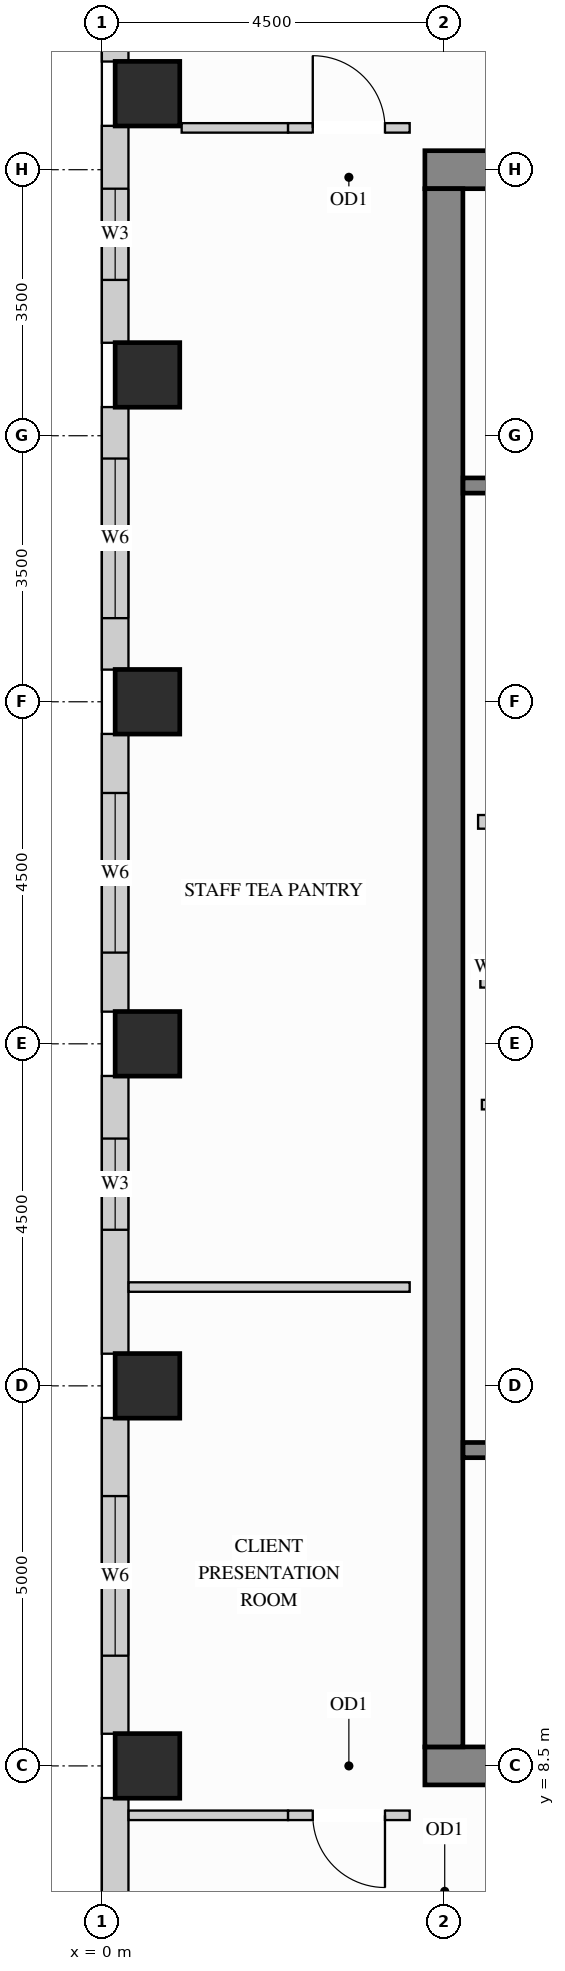
"""IFC4 building model, lengths in metres.
Left out: names, types, materials, properties, quantities, classifications, styles, units other than length and angle.
Written with IfcOpenShell. Run it as: python <this file> out.ifc"""

import sys

from ifc_helpers import new_model, si_unit, direction, frame, frame_2d, origin, origin_2d, place, context, subcontext, project, spatial, rectangle, extrude, source, transform, mapped, element, fill, save


model = new_model("IFC4")
c1 = context("Model", 3, precision=1e-05, world=origin(), true_north=direction((0.0, 1.0)))
c2 = subcontext(c1, "Body", "Model", "MODEL_VIEW")
j1 = project(units=[si_unit("LENGTHUNIT", "METRE"), si_unit("PLANEANGLEUNIT", "RADIAN")], contexts=[c1])
p1 = place(None, origin())
s1 = spatial("IfcSite", under=j1, at=p1, CompositionType="ELEMENT")
p2 = place(p1, origin())
s2 = spatial("IfcBuilding", under=s1, at=p2, CompositionType="ELEMENT")
p3 = place(p2, frame((0.0, 0.0, 241.2)))
s3 = spatial("IfcBuildingStorey", under=s2, at=p3, CompositionType="ELEMENT", Elevation=241.2)
m1 = source(origin(), c2, "Body", "SweptSolid", [
    extrude(rectangle(XDim=0.85, YDim=0.85, at=origin_2d()), origin(), (0.0, 0.0, 1.0), 3.4),
])
for number, where, z_axis, x_axis in (
    (1, (0.6, 13.5, 0.0), (0.0, 0.0, 1.0), (1.0, 0.0, 0.0)),
    (2, (0.6, 18.0, 0.0), (0.0, 0.0, 1.0), (1.0, 0.0, 0.0)),
    (3, (0.6, 22.5, 0.0), (0.0, 0.0, 1.0), (1.0, 0.0, 0.0)),
    (4, (0.6, 26.8, 0.0), (0.0, 0.0, 1.0), (1.0, 0.0, 0.0)),
    (5, (0.6, 30.5, 0.0), (0.0, 0.0, 1.0), (1.0, 0.0, 0.0)),
    (6, (0.6, 8.5, 0.0), (0.0, 0.0, 1.0), (1.0, 0.0, 0.0)),
):
    element("IfcColumn", number, at=place(p3, frame(where, z_axis=z_axis, x_axis=x_axis)), inside=s3, PredefinedType="COLUMN", context=c2, shape_type="MappedRepresentation", body=[
        mapped(m1, transform((0.0, 0.0, 0.0), x_axis=(1.0, 0.0, 0.0), y_axis=(0.0, 1.0, 0.0), z_axis=(0.0, 0.0, 1.0))),
    ])
m2 = source(origin(), c2, "Body", "SweptSolid", [
    extrude(rectangle(XDim=10.5, YDim=0.5, at=frame_2d((5.25, 0.0))), origin(), (0.0, 0.0, 1.0), 3.4),
])
for number, where, z_axis, x_axis in (
    (7, (4.25, 29.5, 0.0), (0.0, 0.0, 1.0), (1.0, 0.0, 0.0)),
    (8, (4.25, 8.5, 0.0), (0.0, 0.0, 1.0), (1.0, 0.0, 0.0)),
):
    element("IfcWall", number, at=place(p3, frame(where, z_axis=z_axis, x_axis=x_axis)), inside=s3, PredefinedType="SHEAR", context=c2, shape_type="MappedRepresentation", body=[
        mapped(m2, transform((0.0, 0.0, 0.0), x_axis=(1.0, 0.0, 0.0), y_axis=(0.0, 1.0, 0.0), z_axis=(0.0, 0.0, 1.0))),
    ])
m3 = source(origin(), c2, "Body", "SweptSolid", [
    extrude(rectangle(XDim=20.5, YDim=0.5, at=frame_2d((10.25, 0.0))), origin(), (0.0, 0.0, 1.0), 3.4),
])
p4 = place(p3, frame((4.5, 8.75, 0.0), z_axis=(0.0, 0.0, 1.0), x_axis=(0.0, 1.0, 0.0)))
e9 = element("IfcWall", 9, at=p4, inside=s3, PredefinedType="SHEAR", context=c2, shape_type="MappedRepresentation", body=[
    mapped(m3, transform((0.0, 0.0, 0.0), x_axis=(1.0, 0.0, 0.0), y_axis=(0.0, 1.0, 0.0), z_axis=(0.0, 0.0, 1.0))),
])
m4 = source(origin(), c2, "Body", "SweptSolid", [
    extrude(rectangle(XDim=0.527, YDim=0.35, at=frame_2d((0.263, 0.0))), origin(), (0.0, 0.0, 1.0), 3.385),
])
p5 = place(p3, frame((0.175, 31.45, 0.0), z_axis=(0.0, 0.0, 1.0), x_axis=(0.0, -1.0, 0.0)))
e10 = element("IfcWall", 10, at=p5, inside=s3, PredefinedType="SOLIDWALL", context=c2, shape_type="MappedRepresentation", body=[
    mapped(m4, transform((0.0, 0.0, 0.0), x_axis=(1.0, 0.0, 0.0), y_axis=(0.0, 1.0, 0.0), z_axis=(0.0, 0.0, 1.0))),
])
p6 = place(p3, frame((0.175, 30.077, 0.0), z_axis=(0.0, 0.0, 1.0), x_axis=(0.0, -1.0, 0.0)))
e11 = element("IfcWall", 11, at=p6, inside=s3, PredefinedType="SOLIDWALL", context=c2, shape_type="SweptSolid", body=[
    extrude(rectangle(XDim=2.854, YDim=0.35, at=frame_2d((1.427, 0.0))), origin(), (0.0, 0.0, 1.0), 3.385),
])
p7 = place(p6, frame((0.827, 0.0, 0.78)))
e12 = element("IfcOpeningElement", 12, at=p7, cuts=e11, PredefinedType="OPENING", context=c2, shape_type="SweptSolid", body=[
    extrude(rectangle(XDim=1.2, YDim=2.25, at=frame_2d((0.6, 1.125))), frame((0.0, 0.185, 0.0), z_axis=(0.0, -1.0, 0.0), x_axis=(1.0, 0.0, 0.0)), (0.0, 0.0, 1.0), 0.37),
])
p8 = place(p3, frame((0.175, 26.377, 0.0), z_axis=(0.0, 0.0, 1.0), x_axis=(0.0, -1.0, 0.0)))
e13 = element("IfcWall", 13, at=p8, inside=s3, PredefinedType="SOLIDWALL", context=c2, shape_type="SweptSolid", body=[
    extrude(rectangle(XDim=3.454, YDim=0.35, at=frame_2d((1.727, 0.0))), origin(), (0.0, 0.0, 1.0), 3.385),
])
p9 = place(p8, frame((0.677, 0.0, 0.78)))
e14 = element("IfcOpeningElement", 14, at=p9, cuts=e13, PredefinedType="OPENING", context=c2, shape_type="SweptSolid", body=[
    extrude(rectangle(XDim=2.1, YDim=2.25, at=frame_2d((1.05, 1.125))), frame((0.0, 0.185, 0.0), z_axis=(0.0, -1.0, 0.0), x_axis=(1.0, 0.0, 0.0)), (0.0, 0.0, 1.0), 0.37),
])
p10 = place(p3, frame((0.175, 22.077, 0.0), z_axis=(0.0, 0.0, 1.0), x_axis=(0.0, -1.0, 0.0)))
e15 = element("IfcWall", 15, at=p10, inside=s3, PredefinedType="SOLIDWALL", context=c2, shape_type="SweptSolid", body=[
    extrude(rectangle(XDim=3.654, YDim=0.35, at=frame_2d((1.827, 0.0))), origin(), (0.0, 0.0, 1.0), 3.385),
])
p11 = place(p10, frame((0.777, 0.0, 0.78)))
e16 = element("IfcOpeningElement", 16, at=p11, cuts=e15, PredefinedType="OPENING", context=c2, shape_type="SweptSolid", body=[
    extrude(rectangle(XDim=2.1, YDim=2.25, at=frame_2d((1.05, 1.125))), frame((0.0, 0.185, 0.0), z_axis=(0.0, -1.0, 0.0), x_axis=(1.0, 0.0, 0.0)), (0.0, 0.0, 1.0), 0.37),
])
p12 = place(p3, frame((0.175, 17.577, 0.0), z_axis=(0.0, 0.0, 1.0), x_axis=(0.0, -1.0, 0.0)))
e17 = element("IfcWall", 17, at=p12, inside=s3, PredefinedType="SOLIDWALL", context=c2, shape_type="SweptSolid", body=[
    extrude(rectangle(XDim=3.654, YDim=0.35, at=frame_2d((1.827, 0.0))), origin(), (0.0, 0.0, 1.0), 3.385),
])
p13 = place(p12, frame((0.823, 0.0, 0.78)))
e18 = element("IfcOpeningElement", 18, at=p13, cuts=e17, PredefinedType="OPENING", context=c2, shape_type="SweptSolid", body=[
    extrude(rectangle(XDim=1.2, YDim=2.25, at=frame_2d((0.6, 1.125))), frame((0.0, 0.185, 0.0), z_axis=(0.0, -1.0, 0.0), x_axis=(1.0, 0.0, 0.0)), (0.0, 0.0, 1.0), 0.37),
])
p14 = place(p3, frame((0.175, 13.077, 0.0), z_axis=(0.0, 0.0, 1.0), x_axis=(0.0, -1.0, 0.0)))
e19 = element("IfcWall", 19, at=p14, inside=s3, PredefinedType="SOLIDWALL", context=c2, shape_type="SweptSolid", body=[
    extrude(rectangle(XDim=4.154, YDim=0.35, at=frame_2d((2.077, 0.0))), origin(), (0.0, 0.0, 1.0), 3.385),
])
p15 = place(p14, frame((1.027, 0.0, 0.78)))
e20 = element("IfcOpeningElement", 20, at=p15, cuts=e19, PredefinedType="OPENING", context=c2, shape_type="SweptSolid", body=[
    extrude(rectangle(XDim=2.1, YDim=2.25, at=frame_2d((1.05, 1.125))), frame((0.0, 0.185, 0.0), z_axis=(0.0, -1.0, 0.0), x_axis=(1.0, 0.0, 0.0)), (0.0, 0.0, 1.0), 0.37),
])
p16 = place(p3, frame((0.175, 8.077, 0.0), z_axis=(0.0, 0.0, 1.0), x_axis=(0.0, -1.0, 0.0)))
e21 = element("IfcWall", 21, at=p16, inside=s3, PredefinedType="SOLIDWALL", context=c2, shape_type="SweptSolid", body=[
    extrude(rectangle(XDim=4.154, YDim=0.35, at=frame_2d((2.077, 0.0))), origin(), (0.0, 0.0, 1.0), 3.385),
])
p17 = place(p16, frame((2.381, 0.0, 0.78)))
e22 = element("IfcOpeningElement", 22, at=p17, cuts=e21, PredefinedType="OPENING", context=c2, shape_type="SweptSolid", body=[
    extrude(rectangle(XDim=1.2, YDim=2.25, at=frame_2d((0.6, 1.125))), frame((0.0, 0.185, 0.0), z_axis=(0.0, -1.0, 0.0), x_axis=(1.0, 0.0, 0.0)), (0.0, 0.0, 1.0), 0.37),
])
m5 = source(origin(), c2, "Body", "SweptSolid", [
    extrude(rectangle(XDim=2.2, YDim=0.18, at=frame_2d((1.1, 0.0))), origin(), (0.0, 0.0, 1.0), 3.385),
])
p18 = place(p3, frame((4.95, 20.92, 0.0), z_axis=(0.0, 0.0, 1.0), x_axis=(1.0, 0.0, 0.0)))
e23 = element("IfcWall", 23, at=p18, inside=s3, PredefinedType="PARTITIONING", context=c2, shape_type="MappedRepresentation", body=[
    mapped(m5, transform((0.0, 0.0, 0.0), x_axis=(1.0, 0.0, 0.0), y_axis=(0.0, 1.0, 0.0), z_axis=(0.0, 0.0, 1.0))),
])
p19 = place(p3, frame((5.0, 17.2, 0.0), z_axis=(0.0, 0.0, 1.0), x_axis=(1.0, 0.0, 0.0)))
e24 = element("IfcWall", 24, at=p19, inside=s3, PredefinedType="PARTITIONING", context=c2, shape_type="SweptSolid", body=[
    extrude(rectangle(XDim=2.4, YDim=0.125, at=frame_2d((1.2, 0.0))), origin(), (0.0, 0.0, 1.0), 3.385),
])
p20 = place(p19, frame((0.7, 0.0, 0.0)))
e25 = element("IfcOpeningElement", 25, at=p20, cuts=e24, PredefinedType="OPENING", context=c2, shape_type="SweptSolid", body=[
    extrude(rectangle(XDim=0.85, YDim=2.1, at=frame_2d((0.425, 1.05))), frame((0.0, 0.073, 0.0), z_axis=(0.0, -1.0, 0.0), x_axis=(1.0, 0.0, 0.0)), (0.0, 0.0, 1.0), 0.145),
])
m6 = source(origin(), c2, "Body", "SweptSolid", [
    extrude(rectangle(XDim=1.4, YDim=0.125, at=frame_2d((0.7, 0.0))), origin(), (0.0, 0.0, 1.0), 3.385),
])
p21 = place(p3, frame((1.05, 30.05, 0.0), z_axis=(0.0, 0.0, 1.0), x_axis=(1.0, 0.0, 0.0)))
e26 = element("IfcWall", 26, at=p21, inside=s3, PredefinedType="PARTITIONING", context=c2, shape_type="MappedRepresentation", body=[
    mapped(m6, transform((0.0, 0.0, 0.0), x_axis=(1.0, 0.0, 0.0), y_axis=(0.0, 1.0, 0.0), z_axis=(0.0, 0.0, 1.0))),
])
p22 = place(p3, frame((2.45, 30.05, 0.0), z_axis=(0.0, 0.0, 1.0), x_axis=(1.0, 0.0, 0.0)))
e27 = element("IfcWall", 27, at=p22, inside=s3, PredefinedType="PARTITIONING", context=c2, shape_type="SweptSolid", body=[
    extrude(rectangle(XDim=1.6, YDim=0.125, at=frame_2d((0.8, 0.0))), origin(), (0.0, 0.0, 1.0), 3.385),
])
p23 = place(p22, frame((0.325, 0.0, 0.0)))
e28 = element("IfcOpeningElement", 28, at=p23, cuts=e27, PredefinedType="OPENING", context=c2, shape_type="SweptSolid", body=[
    extrude(rectangle(XDim=0.95, YDim=2.15, at=frame_2d((0.475, 1.075))), frame((0.0, 0.073, 0.0), z_axis=(0.0, -1.0, 0.0), x_axis=(1.0, 0.0, 0.0)), (0.0, 0.0, 1.0), 0.145),
])
m7 = source(origin(), c2, "Body", "SweptSolid", [
    extrude(rectangle(XDim=2.098, YDim=0.125, at=frame_2d((1.049, 0.0))), origin(), (0.0, 0.0, 1.0), 3.385),
])
p24 = place(p3, frame((0.352, 7.85, 0.0), z_axis=(0.0, 0.0, 1.0), x_axis=(1.0, 0.0, 0.0)))
e29 = element("IfcWall", 29, at=p24, inside=s3, PredefinedType="PARTITIONING", context=c2, shape_type="MappedRepresentation", body=[
    mapped(m7, transform((0.0, 0.0, 0.0), x_axis=(1.0, 0.0, 0.0), y_axis=(0.0, 1.0, 0.0), z_axis=(0.0, 0.0, 1.0))),
])
p25 = place(p3, frame((2.45, 7.85, 0.0), z_axis=(0.0, 0.0, 1.0), x_axis=(1.0, 0.0, 0.0)))
e30 = element("IfcWall", 30, at=p25, inside=s3, PredefinedType="PARTITIONING", context=c2, shape_type="SweptSolid", body=[
    extrude(rectangle(XDim=1.6, YDim=0.125, at=frame_2d((0.8, 0.0))), origin(), (0.0, 0.0, 1.0), 3.385),
])
p26 = place(p25, frame((0.325, 0.0, 0.0)))
e31 = element("IfcOpeningElement", 31, at=p26, cuts=e30, PredefinedType="OPENING", context=c2, shape_type="SweptSolid", body=[
    extrude(rectangle(XDim=0.95, YDim=2.15, at=frame_2d((0.475, 1.075))), frame((0.0, 0.073, 0.0), z_axis=(0.0, -1.0, 0.0), x_axis=(1.0, 0.0, 0.0)), (0.0, 0.0, 1.0), 0.145),
])
m8 = source(origin(), c2, "Body", "SweptSolid", [
    extrude(rectangle(XDim=3.698, YDim=0.125, at=frame_2d((1.849, 0.0))), origin(), (0.0, 0.0, 1.0), 3.385),
])
p27 = place(p3, frame((0.352, 14.8, 0.0), z_axis=(0.0, 0.0, 1.0), x_axis=(1.0, 0.0, 0.0)))
e32 = element("IfcWall", 32, at=p27, inside=s3, PredefinedType="PARTITIONING", context=c2, shape_type="MappedRepresentation", body=[
    mapped(m8, transform((0.0, 0.0, 0.0), x_axis=(1.0, 0.0, 0.0), y_axis=(0.0, 1.0, 0.0), z_axis=(0.0, 0.0, 1.0))),
])
m9 = source(origin(), c2, "Body", "SweptSolid", [
    extrude(rectangle(XDim=2.09, YDim=0.2, at=frame_2d((1.045, 0.0))), origin(), (0.0, 0.0, 1.0), 3.385),
])
p28 = place(p3, frame((4.98, 18.84, 0.0), z_axis=(0.0, 0.0, 1.0), x_axis=(1.0, 0.0, 0.0)))
e33 = element("IfcWall", 33, at=p28, inside=s3, PredefinedType="PARTITIONING", context=c2, shape_type="MappedRepresentation", body=[
    mapped(m9, transform((0.0, 0.0, 0.0), x_axis=(1.0, 0.0, 0.0), y_axis=(0.0, 1.0, 0.0), z_axis=(0.0, 0.0, 1.0))),
])
p29 = place(p3, frame((4.752, 12.655, 0.0), z_axis=(0.0, 0.0, 1.0), x_axis=(1.0, 0.0, 0.0)))
e34 = element("IfcWall", 34, at=p29, inside=s3, PredefinedType="SHEAR", context=c2, shape_type="SweptSolid", body=[
    extrude(rectangle(XDim=7.653, YDim=0.2, at=frame_2d((3.827, 0.0))), origin(), (0.0, 0.0, 1.0), 3.4),
])
p30 = place(p29, frame((0.4, 0.0, 0.0)))
e35 = element("IfcOpeningElement", 35, at=p30, cuts=e34, PredefinedType="OPENING", context=c2, shape_type="SweptSolid", body=[
    extrude(rectangle(XDim=1.1, YDim=2.15, at=frame_2d((0.55, 1.075))), frame((0.0, 0.11, 0.0), z_axis=(0.0, -1.0, 0.0), x_axis=(1.0, 0.0, 0.0)), (0.0, 0.0, 1.0), 0.22),
])
p31 = place(p3, frame((4.752, 25.345, 0.0), z_axis=(0.0, 0.0, 1.0), x_axis=(1.0, 0.0, 0.0)))
e36 = element("IfcWall", 36, at=p31, inside=s3, PredefinedType="SHEAR", context=c2, shape_type="SweptSolid", body=[
    extrude(rectangle(XDim=7.653, YDim=0.2, at=frame_2d((3.827, 0.0))), origin(), (0.0, 0.0, 1.0), 3.4),
])
p32 = place(p31, frame((0.4, 0.0, 0.0)))
e37 = element("IfcOpeningElement", 37, at=p32, cuts=e36, PredefinedType="OPENING", context=c2, shape_type="SweptSolid", body=[
    extrude(rectangle(XDim=1.1, YDim=2.15, at=frame_2d((0.55, 1.075))), frame((0.0, 0.11, 0.0), z_axis=(0.0, -1.0, 0.0), x_axis=(1.0, 0.0, 0.0)), (0.0, 0.0, 1.0), 0.22),
])
m10 = source(origin(), c2, "Body", "SweptSolid", [
    extrude(rectangle(XDim=0.95, YDim=2.15, at=frame_2d((0.475, 1.075))), frame((0.0, 0.025, 0.0), z_axis=(0.0, -1.0, 0.0), x_axis=(1.0, 0.0, 0.0)), (0.0, 0.0, 1.0), 0.05),
])
p33 = place(p26, origin())
e38 = element("IfcDoor", 38, at=p33, inside=s3, OperationType="SINGLE_SWING_RIGHT", PredefinedType="DOOR", context=c2, shape_type="MappedRepresentation", body=[
    mapped(m10, transform((0.0, 0.0, 0.0), x_axis=(1.0, 0.0, 0.0), y_axis=(0.0, 1.0, 0.0), z_axis=(0.0, 0.0, 1.0))),
])
fill(e31, e38)
p34 = place(p23, origin())
e39 = element("IfcDoor", 39, at=p34, inside=s3, OperationType="SINGLE_SWING_LEFT", PredefinedType="DOOR", context=c2, shape_type="MappedRepresentation", body=[
    mapped(m10, transform((0.0, 0.0, 0.0), x_axis=(1.0, 0.0, 0.0), y_axis=(0.0, 1.0, 0.0), z_axis=(0.0, 0.0, 1.0))),
])
fill(e28, e39)
m11 = source(origin(), c2, "Body", "SweptSolid", [
    extrude(rectangle(XDim=1.2, YDim=2.25, at=frame_2d((0.6, 1.125))), frame((0.0, 0.03, 0.0), z_axis=(0.0, -1.0, 0.0), x_axis=(1.0, 0.0, 0.0)), (0.0, 0.0, 1.0), 0.06),
])
p35 = place(p7, origin())
e40 = element("IfcWindow", 40, at=p35, inside=s3, PartitioningType="SINGLE_PANEL", PredefinedType="WINDOW", context=c2, shape_type="MappedRepresentation", body=[
    mapped(m11, transform((0.0, 0.0, 0.0), x_axis=(1.0, 0.0, 0.0), y_axis=(0.0, 1.0, 0.0), z_axis=(0.0, 0.0, 1.0))),
])
fill(e12, e40)
p36 = place(p13, origin())
e41 = element("IfcWindow", 41, at=p36, inside=s3, PartitioningType="SINGLE_PANEL", PredefinedType="WINDOW", context=c2, shape_type="MappedRepresentation", body=[
    mapped(m11, transform((0.0, 0.0, 0.0), x_axis=(1.0, 0.0, 0.0), y_axis=(0.0, 1.0, 0.0), z_axis=(0.0, 0.0, 1.0))),
])
fill(e18, e41)
m12 = source(origin(), c2, "Body", "SweptSolid", [
    extrude(rectangle(XDim=2.1, YDim=2.25, at=frame_2d((1.05, 1.125))), frame((0.0, 0.03, 0.0), z_axis=(0.0, -1.0, 0.0), x_axis=(1.0, 0.0, 0.0)), (0.0, 0.0, 1.0), 0.06),
])
p37 = place(p9, origin())
e42 = element("IfcWindow", 42, at=p37, inside=s3, PartitioningType="SINGLE_PANEL", PredefinedType="WINDOW", context=c2, shape_type="MappedRepresentation", body=[
    mapped(m12, transform((0.0, 0.0, 0.0), x_axis=(1.0, 0.0, 0.0), y_axis=(0.0, 1.0, 0.0), z_axis=(0.0, 0.0, 1.0))),
])
fill(e14, e42)
p38 = place(p11, origin())
e43 = element("IfcWindow", 43, at=p38, inside=s3, PartitioningType="SINGLE_PANEL", PredefinedType="WINDOW", context=c2, shape_type="MappedRepresentation", body=[
    mapped(m12, transform((0.0, 0.0, 0.0), x_axis=(1.0, 0.0, 0.0), y_axis=(0.0, 1.0, 0.0), z_axis=(0.0, 0.0, 1.0))),
])
fill(e16, e43)
p39 = place(p15, origin())
e44 = element("IfcWindow", 44, at=p39, inside=s3, PartitioningType="SINGLE_PANEL", PredefinedType="WINDOW", context=c2, shape_type="MappedRepresentation", body=[
    mapped(m12, transform((0.0, 0.0, 0.0), x_axis=(1.0, 0.0, 0.0), y_axis=(0.0, 1.0, 0.0), z_axis=(0.0, 0.0, 1.0))),
])
fill(e20, e44)
save(model, sys.argv[1])
